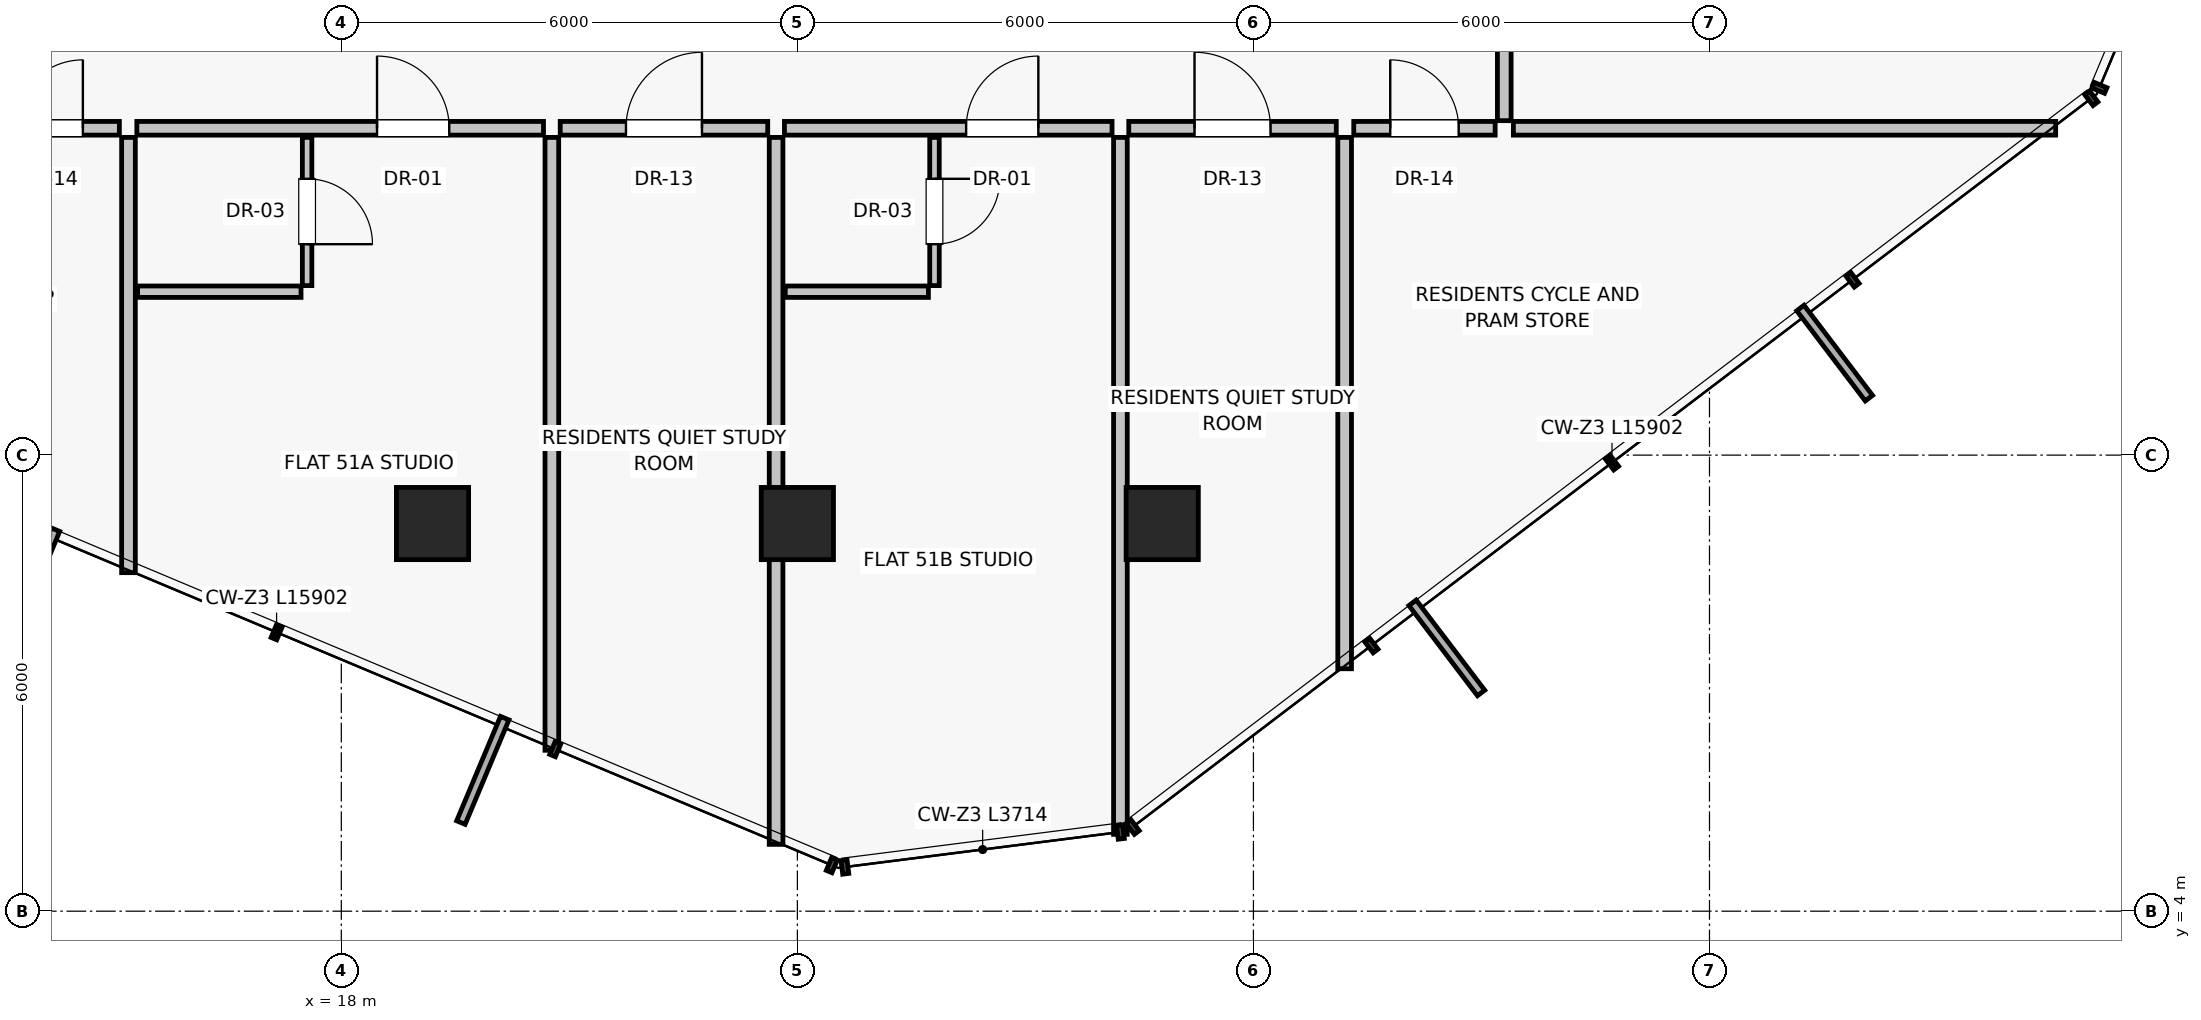
"""IFC4 building model, lengths in metres.
Left out: names, types, materials, properties, quantities, classifications, styles, units other than length and angle.
Written with IfcOpenShell. Run it as: python <this file> out.ifc"""

import sys

from ifc_helpers import new_model, si_unit, direction, frame, frame_2d, origin, origin_2d, place, context, subcontext, project, spatial, rectangle, extrude, source, transform, mapped, element, fill, save


model = new_model("IFC4")
c1 = context("Model", 3, precision=1e-05, world=origin(), true_north=direction((0.0, 1.0)))
c2 = subcontext(c1, "Body", "Model", "MODEL_VIEW")
j1 = project(units=[si_unit("LENGTHUNIT", "METRE"), si_unit("PLANEANGLEUNIT", "RADIAN")], contexts=[c1])
p1 = place(None, origin())
s1 = spatial("IfcSite", under=j1, at=p1, CompositionType="ELEMENT")
p2 = place(p1, origin())
s2 = spatial("IfcBuilding", under=s1, at=p2, CompositionType="ELEMENT")
p3 = place(p2, frame((0.0, 0.0, 182.1)))
s3 = spatial("IfcBuildingStorey", under=s2, at=p3, CompositionType="ELEMENT", Elevation=182.1)
for number, where, z_axis, x_axis in (
    (1, (19.2, 9.1, 0.0), (0.0, 0.0, 1.0), (1.0, 0.0, 0.0)),
    (2, (24.0, 9.1, 0.0), (0.0, 0.0, 1.0), (1.0, 0.0, 0.0)),
    (3, (28.8, 9.1, 0.0), (0.0, 0.0, 1.0), (1.0, 0.0, 0.0)),
):
    element("IfcColumn", number, at=place(p3, frame(where, z_axis=z_axis, x_axis=x_axis)), inside=s3, PredefinedType="COLUMN", context=c2, shape_type="SweptSolid", body=[
        extrude(rectangle(XDim=0.95, YDim=0.95, at=origin_2d()), origin(), (0.0, 0.0, 1.0), 3.25),
    ])
p4 = place(p3, frame((15.2, 14.18, 0.0), z_axis=(0.0, 0.0, 1.0), x_axis=(0.0, -1.0, 0.0)))
e4 = element("IfcWall", 4, at=p4, inside=s3, PredefinedType="PARTITIONING", context=c2, shape_type="SweptSolid", body=[
    extrude(rectangle(XDim=5.726, YDim=0.18, at=frame_2d((2.863, 0.0))), origin(), (0.0, 0.0, 1.0), 3.015),
])
p5 = place(p3, frame((31.2, 14.18, 0.0), z_axis=(0.0, 0.0, 1.0), x_axis=(0.0, -1.0, 0.0)))
e5 = element("IfcWall", 5, at=p5, inside=s3, PredefinedType="PARTITIONING", context=c2, shape_type="SweptSolid", body=[
    extrude(rectangle(XDim=6.991, YDim=0.18, at=frame_2d((3.495, 0.0))), origin(), (0.0, 0.0, 1.0), 3.015),
])
p6 = place(p3, frame((20.88, 14.3, 0.0), z_axis=(0.0, 0.0, 1.0), x_axis=(1.0, 0.0, 0.0)))
e6 = element("IfcWall", 6, at=p6, inside=s3, PredefinedType="PARTITIONING", context=c2, shape_type="SweptSolid", body=[
    extrude(rectangle(XDim=2.73, YDim=0.18, at=frame_2d((1.365, 0.0))), origin(), (0.0, 0.0, 1.0), 3.015),
])
p7 = place(p6, frame((0.865, 0.0, 0.0)))
e7 = element("IfcOpeningElement", 7, at=p7, cuts=e6, PredefinedType="OPENING", context=c2, shape_type="SweptSolid", body=[
    extrude(rectangle(XDim=1.0, YDim=2.01, at=frame_2d((0.5, 1.005))), frame((0.0, 0.1, 0.0), z_axis=(0.0, -1.0, 0.0), x_axis=(1.0, 0.0, 0.0)), (0.0, 0.0, 1.0), 0.2),
])
p8 = place(p3, frame((20.77, 14.18, 0.0), z_axis=(0.0, 0.0, 1.0), x_axis=(0.0, -1.0, 0.0)))
e8 = element("IfcWall", 8, at=p8, inside=s3, PredefinedType="PARTITIONING", context=c2, shape_type="SweptSolid", body=[
    extrude(rectangle(XDim=8.063, YDim=0.18, at=frame_2d((4.031, 0.0))), origin(), (0.0, 0.0, 1.0), 2.469),
])
p9 = place(p3, frame((15.31, 14.3, 0.0), z_axis=(0.0, 0.0, 1.0), x_axis=(1.0, 0.0, 0.0)))
e9 = element("IfcWall", 9, at=p9, inside=s3, PredefinedType="PARTITIONING", context=c2, shape_type="SweptSolid", body=[
    extrude(rectangle(XDim=5.35, YDim=0.18, at=frame_2d((2.675, 0.0))), origin(), (0.0, 0.0, 1.0), 3.015),
])
p10 = place(p9, frame((3.16, 0.0, 0.0)))
e10 = element("IfcOpeningElement", 10, at=p10, cuts=e9, PredefinedType="OPENING", context=c2, shape_type="SweptSolid", body=[
    extrude(rectangle(XDim=0.95, YDim=2.02, at=frame_2d((0.475, 1.01))), frame((0.0, 0.1, 0.0), z_axis=(0.0, -1.0, 0.0), x_axis=(1.0, 0.0, 0.0)), (0.0, 0.0, 1.0), 0.2),
])
p11 = place(p3, frame((17.55, 14.18, 0.0), z_axis=(0.0, 0.0, 1.0), x_axis=(0.0, -1.0, 0.0)))
e11 = element("IfcWall", 11, at=p11, inside=s3, PredefinedType="PARTITIONING", context=c2, shape_type="SweptSolid", body=[
    extrude(rectangle(XDim=1.95, YDim=0.125, at=frame_2d((0.975, 0.0))), origin(), (0.0, 0.0, 1.0), 3.015),
])
p12 = place(p11, frame((0.545, 0.0, 0.0)))
e12 = element("IfcOpeningElement", 12, at=p12, cuts=e11, PredefinedType="OPENING", context=c2, shape_type="SweptSolid", body=[
    extrude(rectangle(XDim=0.86, YDim=2.01, at=frame_2d((0.43, 1.005))), frame((0.0, 0.073, 0.0), z_axis=(0.0, -1.0, 0.0), x_axis=(1.0, 0.0, 0.0)), (0.0, 0.0, 1.0), 0.145),
])
p13 = place(p3, frame((15.32, 12.15, 0.0), z_axis=(0.0, 0.0, 1.0), x_axis=(1.0, 0.0, 0.0)))
e13 = element("IfcWall", 13, at=p13, inside=s3, PredefinedType="PARTITIONING", context=c2, shape_type="SweptSolid", body=[
    extrude(rectangle(XDim=2.15, YDim=0.15, at=frame_2d((1.075, 0.0))), origin(), (0.0, 0.0, 1.0), 3.015),
])
p14 = place(p3, frame((23.72, 14.18, 0.0), z_axis=(0.0, 0.0, 1.0), x_axis=(0.0, -1.0, 0.0)))
e14 = element("IfcWall", 14, at=p14, inside=s3, PredefinedType="PARTITIONING", context=c2, shape_type="SweptSolid", body=[
    extrude(rectangle(XDim=9.301, YDim=0.18, at=frame_2d((4.65, 0.0))), origin(), (0.0, 0.0, 1.0), 3.015),
])
p15 = place(p3, frame((28.36, 14.3, 0.0), z_axis=(0.0, 0.0, 1.0), x_axis=(1.0, 0.0, 0.0)))
e15 = element("IfcWall", 15, at=p15, inside=s3, PredefinedType="PARTITIONING", context=c2, shape_type="SweptSolid", body=[
    extrude(rectangle(XDim=2.73, YDim=0.18, at=frame_2d((1.365, 0.0))), origin(), (0.0, 0.0, 1.0), 3.015),
])
p16 = place(p15, frame((0.865, 0.0, 0.0)))
e16 = element("IfcOpeningElement", 16, at=p16, cuts=e15, PredefinedType="OPENING", context=c2, shape_type="SweptSolid", body=[
    extrude(rectangle(XDim=1.0, YDim=2.01, at=frame_2d((0.5, 1.005))), frame((0.0, 0.1, 0.0), z_axis=(0.0, -1.0, 0.0), x_axis=(1.0, 0.0, 0.0)), (0.0, 0.0, 1.0), 0.2),
])
p17 = place(p3, frame((28.25, 14.18, 0.0), z_axis=(0.0, 0.0, 1.0), x_axis=(0.0, -1.0, 0.0)))
e17 = element("IfcWall", 17, at=p17, inside=s3, PredefinedType="PARTITIONING", context=c2, shape_type="SweptSolid", body=[
    extrude(rectangle(XDim=9.169, YDim=0.18, at=frame_2d((4.584, 0.0))), origin(), (0.0, 0.0, 1.0), 2.469),
])
p18 = place(p3, frame((23.83, 14.3, 0.0), z_axis=(0.0, 0.0, 1.0), x_axis=(1.0, 0.0, 0.0)))
e18 = element("IfcWall", 18, at=p18, inside=s3, PredefinedType="PARTITIONING", context=c2, shape_type="SweptSolid", body=[
    extrude(rectangle(XDim=4.31, YDim=0.18, at=frame_2d((2.155, 0.0))), origin(), (0.0, 0.0, 1.0), 3.015),
])
p19 = place(p18, frame((2.39, 0.0, 0.0)))
e19 = element("IfcOpeningElement", 19, at=p19, cuts=e18, PredefinedType="OPENING", context=c2, shape_type="SweptSolid", body=[
    extrude(rectangle(XDim=0.95, YDim=2.02, at=frame_2d((0.475, 1.01))), frame((0.0, 0.1, 0.0), z_axis=(0.0, -1.0, 0.0), x_axis=(1.0, 0.0, 0.0)), (0.0, 0.0, 1.0), 0.2),
])
p20 = place(p3, frame((25.804, 14.18, 0.0), z_axis=(0.0, 0.0, 1.0), x_axis=(0.0, -1.0, 0.0)))
e20 = element("IfcWall", 20, at=p20, inside=s3, PredefinedType="PARTITIONING", context=c2, shape_type="SweptSolid", body=[
    extrude(rectangle(XDim=1.95, YDim=0.125, at=frame_2d((0.975, 0.0))), origin(), (0.0, 0.0, 1.0), 3.015),
])
p21 = place(p20, frame((0.545, 0.0, 0.0)))
e21 = element("IfcOpeningElement", 21, at=p21, cuts=e20, PredefinedType="OPENING", context=c2, shape_type="SweptSolid", body=[
    extrude(rectangle(XDim=0.86, YDim=2.01, at=frame_2d((0.43, 1.005))), frame((0.0, 0.073, 0.0), z_axis=(0.0, -1.0, 0.0), x_axis=(1.0, 0.0, 0.0)), (0.0, 0.0, 1.0), 0.145),
])
p22 = place(p3, frame((23.84, 12.15, 0.0), z_axis=(0.0, 0.0, 1.0), x_axis=(1.0, 0.0, 0.0)))
e22 = element("IfcWall", 22, at=p22, inside=s3, PredefinedType="PARTITIONING", context=c2, shape_type="SweptSolid", body=[
    extrude(rectangle(XDim=1.884, YDim=0.15, at=frame_2d((0.942, 0.0))), origin(), (0.0, 0.0, 1.0), 3.015),
])
p23 = place(p3, frame((33.3, 14.4, 0.0), z_axis=(0.0, 0.0, 1.0), x_axis=(0.0, 1.0, 0.0)))
e23 = element("IfcWall", 23, at=p23, inside=s3, PredefinedType="PARTITIONING", context=c2, shape_type="SweptSolid", body=[
    extrude(rectangle(XDim=1.9, YDim=0.18, at=frame_2d((0.95, 0.0))), origin(), (0.0, 0.0, 1.0), 3.015),
])
p24 = place(p3, frame((13.22, 14.3, 0.0), z_axis=(0.0, 0.0, 1.0), x_axis=(1.0, 0.0, 0.0)))
e24 = element("IfcWall", 24, at=p24, inside=s3, PredefinedType="PARTITIONING", context=c2, shape_type="SweptSolid", body=[
    extrude(rectangle(XDim=1.86, YDim=0.18, at=frame_2d((0.93, 0.0))), origin(), (0.0, 0.0, 1.0), 3.015),
])
p25 = place(p24, frame((0.48, 0.0, 0.0)))
e25 = element("IfcOpeningElement", 25, at=p25, cuts=e24, PredefinedType="OPENING", context=c2, shape_type="SweptSolid", body=[
    extrude(rectangle(XDim=0.9, YDim=2.01, at=frame_2d((0.45, 1.005))), frame((0.0, 0.1, 0.0), z_axis=(0.0, -1.0, 0.0), x_axis=(1.0, 0.0, 0.0)), (0.0, 0.0, 1.0), 0.2),
])
p26 = place(p3, frame((33.42, 14.3, 0.0), z_axis=(0.0, 0.0, 1.0), x_axis=(1.0, 0.0, 0.0)))
e26 = element("IfcWall", 26, at=p26, inside=s3, PredefinedType="PARTITIONING", context=c2, shape_type="SweptSolid", body=[
    extrude(rectangle(XDim=7.135, YDim=0.18, at=frame_2d((3.567, 0.0))), origin(), (0.0, 0.0, 1.0), 3.015),
])
p27 = place(p3, frame((31.32, 14.3, 0.0), z_axis=(0.0, 0.0, 1.0), x_axis=(1.0, 0.0, 0.0)))
e27 = element("IfcWall", 27, at=p27, inside=s3, PredefinedType="PARTITIONING", context=c2, shape_type="SweptSolid", body=[
    extrude(rectangle(XDim=1.86, YDim=0.18, at=frame_2d((0.93, 0.0))), origin(), (0.0, 0.0, 1.0), 3.015),
])
p28 = place(p27, frame((0.48, 0.0, 0.0)))
e28 = element("IfcOpeningElement", 28, at=p28, cuts=e27, PredefinedType="OPENING", context=c2, shape_type="SweptSolid", body=[
    extrude(rectangle(XDim=0.9, YDim=2.01, at=frame_2d((0.45, 1.005))), frame((0.0, 0.1, 0.0), z_axis=(0.0, -1.0, 0.0), x_axis=(1.0, 0.0, 0.0)), (0.0, 0.0, 1.0), 0.2),
])
m1 = source(origin(), c2, "Body", "SweptSolid", [
    extrude(rectangle(XDim=1.0, YDim=2.01, at=frame_2d((0.5, 1.005))), frame((0.0, 0.025, 0.0), z_axis=(0.0, -1.0, 0.0), x_axis=(1.0, 0.0, 0.0)), (0.0, 0.0, 1.0), 0.05),
])
p29 = place(p7, origin())
e29 = element("IfcDoor", 29, at=p29, inside=s3, OperationType="SINGLE_SWING_RIGHT", PredefinedType="DOOR", context=c2, shape_type="MappedRepresentation", body=[
    mapped(m1, transform((0.0, 0.0, 0.0), scale=1.0)),
])
fill(e7, e29)
m2 = source(origin(), c2, "Body", "SweptSolid", [
    extrude(rectangle(XDim=0.95, YDim=2.02, at=frame_2d((0.475, 1.01))), frame((0.0, 0.025, 0.0), z_axis=(0.0, -1.0, 0.0), x_axis=(1.0, 0.0, 0.0)), (0.0, 0.0, 1.0), 0.05),
])
p30 = place(p10, origin())
e30 = element("IfcDoor", 30, at=p30, inside=s3, OperationType="SINGLE_SWING_LEFT", PredefinedType="DOOR", context=c2, shape_type="MappedRepresentation", body=[
    mapped(m2, transform((0.0, 0.0, 0.0), scale=1.0)),
])
fill(e10, e30)
m3 = source(origin(), c2, "Body", "SweptSolid", [
    extrude(rectangle(XDim=0.86, YDim=2.01, at=frame_2d((0.43, 1.005))), frame((0.0, 0.025, 0.0), z_axis=(0.0, -1.0, 0.0), x_axis=(1.0, 0.0, 0.0)), (0.0, 0.0, 1.0), 0.05),
])
p31 = place(p12, origin())
e31 = element("IfcDoor", 31, at=p31, inside=s3, OperationType="SINGLE_SWING_RIGHT", PredefinedType="DOOR", context=c2, shape_type="MappedRepresentation", body=[
    mapped(m3, transform((0.0, 0.0, 0.0), scale=1.0)),
])
fill(e12, e31)
p32 = place(p16, origin())
e32 = element("IfcDoor", 32, at=p32, inside=s3, OperationType="SINGLE_SWING_LEFT", PredefinedType="DOOR", context=c2, shape_type="MappedRepresentation", body=[
    mapped(m1, transform((0.0, 0.0, 0.0), scale=1.0)),
])
fill(e16, e32)
p33 = place(p19, origin())
e33 = element("IfcDoor", 33, at=p33, inside=s3, OperationType="SINGLE_SWING_RIGHT", PredefinedType="DOOR", context=c2, shape_type="MappedRepresentation", body=[
    mapped(m2, transform((0.0, 0.0, 0.0), scale=1.0)),
])
fill(e19, e33)
p34 = place(p21, origin())
e34 = element("IfcDoor", 34, at=p34, inside=s3, OperationType="SINGLE_SWING_LEFT", PredefinedType="DOOR", context=c2, shape_type="MappedRepresentation", body=[
    mapped(m3, transform((0.0, 0.0, 0.0), scale=1.0)),
])
fill(e21, e34)
m4 = source(origin(), c2, "Body", "SweptSolid", [
    extrude(rectangle(XDim=0.9, YDim=2.01, at=frame_2d((0.45, 1.005))), frame((0.0, 0.025, 0.0), z_axis=(0.0, -1.0, 0.0), x_axis=(1.0, 0.0, 0.0)), (0.0, 0.0, 1.0), 0.05),
])
p35 = place(p25, origin())
e35 = element("IfcDoor", 35, at=p35, inside=s3, OperationType="SINGLE_SWING_RIGHT", PredefinedType="DOOR", context=c2, shape_type="MappedRepresentation", body=[
    mapped(m4, transform((0.0, 0.0, 0.0), scale=1.0)),
])
fill(e25, e35)
p36 = place(p28, origin())
e36 = element("IfcDoor", 36, at=p36, inside=s3, OperationType="SINGLE_SWING_LEFT", PredefinedType="DOOR", context=c2, shape_type="MappedRepresentation", body=[
    mapped(m4, transform((0.0, 0.0, 0.0), scale=1.0)),
])
fill(e28, e36)
save(model, sys.argv[1])
